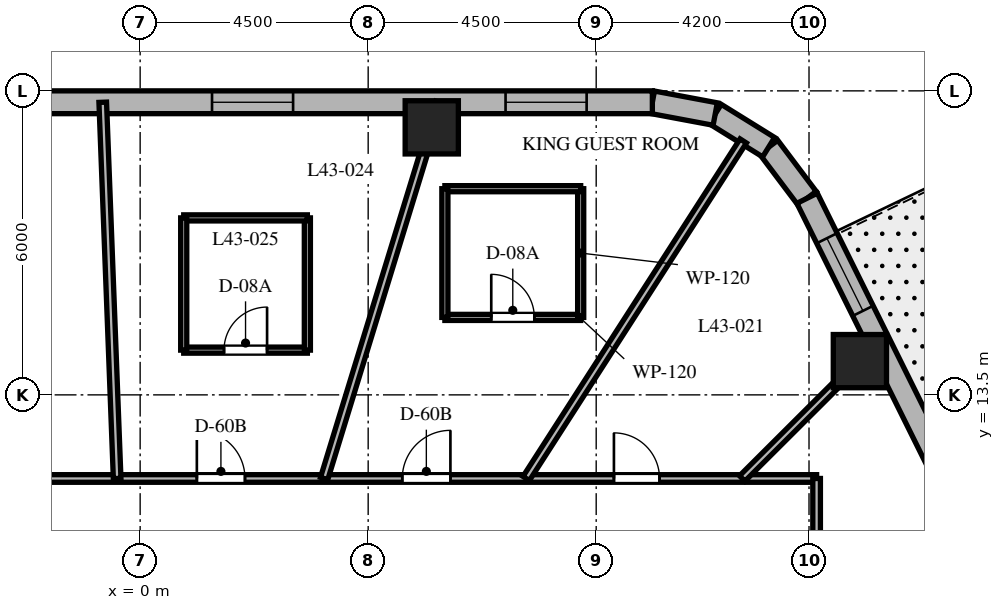
"""IFC4 building model, lengths in metres.
Left out: names, types, materials, properties, quantities, classifications, styles, units other than length and angle.
Written with IfcOpenShell. Run it as: python <this file> out.ifc"""

import sys

from ifc_helpers import new_model, si_unit, direction, frame, frame_2d, origin, origin_2d, place, context, subcontext, project, spatial, rectangle, extrude, element, fill, save


model = new_model("IFC4")
c1 = context("Model", 3, precision=1e-05, world=origin(), true_north=direction((0.0, 1.0)))
c2 = subcontext(c1, "Body", "Model", "MODEL_VIEW")
j1 = project(units=[si_unit("LENGTHUNIT", "METRE"), si_unit("PLANEANGLEUNIT", "RADIAN")], contexts=[c1])
p1 = place(None, origin())
s1 = spatial("IfcSite", under=j1, at=p1, CompositionType="ELEMENT")
p2 = place(p1, origin())
s2 = spatial("IfcBuilding", under=s1, at=p2, CompositionType="ELEMENT")
p3 = place(p2, frame((0.0, 0.0, 175.6)))
s3 = spatial("IfcBuildingStorey", under=s2, at=p3, CompositionType="ELEMENT", Elevation=175.6)
for number, where, z_axis, x_axis in (
    (1, (14.204, 14.166, 0.0), (0.0, 0.0, 1.0), (1.0, 0.0, 0.0)),
    (2, (5.755, 18.78, 0.0), (0.0, 0.0, 1.0), (1.0, 0.0, 0.0)),
):
    element("IfcColumn", number, at=place(p3, frame(where, z_axis=z_axis, x_axis=x_axis)), inside=s3, PredefinedType="COLUMN", context=c2, shape_type="SweptSolid", body=[
        extrude(rectangle(XDim=1.05, YDim=1.05, at=origin_2d()), origin(), (0.0, 0.0, 1.0), 3.7),
    ])
p4 = place(p3, frame((13.162, 17.381, 0.0), z_axis=(0.0, 0.0, 1.0), x_axis=(-0.601515770517, 0.798860925205, 0.0)))
e3 = element("IfcWall", 3, at=p4, inside=s3, PredefinedType="SOLIDWALL", context=c2, shape_type="SweptSolid", body=[
    extrude(rectangle(XDim=1.262, YDim=0.45, at=frame_2d((0.631, 0.0))), origin(), (0.0, 0.0, 1.0), 3.4),
])
p5 = place(p3, frame((12.403, 18.389, 0.0), z_axis=(0.0, 0.0, 1.0), x_axis=(-0.849795170926, 0.527113049991, 0.0)))
e4 = element("IfcWall", 4, at=p5, inside=s3, PredefinedType="SOLIDWALL", context=c2, shape_type="SweptSolid", body=[
    extrude(rectangle(XDim=1.241, YDim=0.45, at=frame_2d((0.62, 0.0))), origin(), (0.0, 0.0, 1.0), 3.4),
])
p6 = place(p3, frame((11.349, 19.043, 0.0), z_axis=(0.0, 0.0, 1.0), x_axis=(-0.982931267051, 0.183973161772, 0.0)))
e5 = element("IfcWall", 5, at=p6, inside=s3, PredefinedType="SOLIDWALL", context=c2, shape_type="SweptSolid", body=[
    extrude(rectangle(XDim=1.262, YDim=0.45, at=frame_2d((0.631, 0.0))), origin(), (0.0, 0.0, 1.0), 3.4),
])
p7 = place(p3, frame((20.618, 2.344, 0.0), z_axis=(0.0, 0.0, 1.0), x_axis=(-0.444243691097, 0.895905990002, 0.0)))
e6 = element("IfcWall", 6, at=p7, inside=s3, PredefinedType="SOLIDWALL", context=c2, shape_type="SweptSolid", body=[
    extrude(rectangle(XDim=16.784, YDim=0.45, at=frame_2d((8.392, 0.0))), origin(), (0.0, 0.0, 1.0), 3.4),
])
p8 = place(p7, frame((4.535, 0.0, 0.0)))
e7 = element("IfcOpeningElement", 7, at=p8, cuts=e6, PredefinedType="OPENING", context=c2, shape_type="SweptSolid", body=[
    extrude(rectangle(XDim=1.0, YDim=2.15, at=frame_2d((0.5, 1.075))), frame((0.0, 0.235, 0.0), z_axis=(0.0, -1.0, 0.0), x_axis=(1.0, 0.0, 0.0)), (0.0, 0.0, 1.0), 0.47),
])
p9 = place(p7, frame((0.931, 0.0, 0.8)))
e8 = element("IfcOpeningElement", 8, at=p9, cuts=e6, PredefinedType="OPENING", context=c2, shape_type="SweptSolid", body=[
    extrude(rectangle(XDim=1.6, YDim=1.75, at=frame_2d((0.8, 0.875))), frame((0.0, 0.235, 0.0), z_axis=(0.0, -1.0, 0.0), x_axis=(1.0, 0.0, 0.0)), (0.0, 0.0, 1.0), 0.47),
])
p10 = place(p7, frame((7.642, 0.0, 0.8)))
e9 = element("IfcOpeningElement", 9, at=p10, cuts=e6, PredefinedType="OPENING", context=c2, shape_type="SweptSolid", body=[
    extrude(rectangle(XDim=1.6, YDim=1.75, at=frame_2d((0.8, 0.875))), frame((0.0, 0.235, 0.0), z_axis=(0.0, -1.0, 0.0), x_axis=(1.0, 0.0, 0.0)), (0.0, 0.0, 1.0), 0.47),
])
p11 = place(p7, frame((14.303, 0.0, 0.8)))
e10 = element("IfcOpeningElement", 10, at=p11, cuts=e6, PredefinedType="OPENING", context=c2, shape_type="SweptSolid", body=[
    extrude(rectangle(XDim=1.6, YDim=1.75, at=frame_2d((0.8, 0.875))), frame((0.0, 0.235, 0.0), z_axis=(0.0, -1.0, 0.0), x_axis=(1.0, 0.0, 0.0)), (0.0, 0.0, 1.0), 0.47),
])
p12 = place(p3, frame((10.108, 19.275, 0.0), z_axis=(0.0, 0.0, 1.0), x_axis=(-1.0, 0.0, 0.0)))
e11 = element("IfcWall", 11, at=p12, inside=s3, PredefinedType="SOLIDWALL", context=c2, shape_type="SweptSolid", body=[
    extrude(rectangle(XDim=21.829, YDim=0.45, at=frame_2d((10.915, 0.0))), origin(), (0.0, 0.0, 1.0), 3.4),
])
p13 = place(p12, frame((1.297, 0.0, 0.8)))
e12 = element("IfcOpeningElement", 12, at=p13, cuts=e11, PredefinedType="OPENING", context=c2, shape_type="SweptSolid", body=[
    extrude(rectangle(XDim=1.6, YDim=1.75, at=frame_2d((0.8, 0.875))), frame((0.0, 0.235, 0.0), z_axis=(0.0, -1.0, 0.0), x_axis=(1.0, 0.0, 0.0)), (0.0, 0.0, 1.0), 0.47),
])
p14 = place(p12, frame((7.09, 0.0, 0.8)))
e13 = element("IfcOpeningElement", 13, at=p14, cuts=e11, PredefinedType="OPENING", context=c2, shape_type="SweptSolid", body=[
    extrude(rectangle(XDim=1.6, YDim=1.75, at=frame_2d((0.8, 0.875))), frame((0.0, 0.235, 0.0), z_axis=(0.0, -1.0, 0.0), x_axis=(1.0, 0.0, 0.0)), (0.0, 0.0, 1.0), 0.47),
])
p15 = place(p12, frame((13.072, 0.0, 0.8)))
e14 = element("IfcOpeningElement", 14, at=p15, cuts=e11, PredefinedType="OPENING", context=c2, shape_type="SweptSolid", body=[
    extrude(rectangle(XDim=1.6, YDim=1.75, at=frame_2d((0.8, 0.875))), frame((0.0, 0.235, 0.0), z_axis=(0.0, -1.0, 0.0), x_axis=(1.0, 0.0, 0.0)), (0.0, 0.0, 1.0), 0.47),
])
p16 = place(p12, frame((18.933, 0.0, 0.8)))
e15 = element("IfcOpeningElement", 15, at=p16, cuts=e11, PredefinedType="OPENING", context=c2, shape_type="SweptSolid", body=[
    extrude(rectangle(XDim=1.6, YDim=1.75, at=frame_2d((0.8, 0.875))), frame((0.0, 0.235, 0.0), z_axis=(0.0, -1.0, 0.0), x_axis=(1.0, 0.0, 0.0)), (0.0, 0.0, 1.0), 0.47),
])
p17 = place(p3, frame((-13.35, 11.85, 0.0), z_axis=(0.0, 0.0, 1.0), x_axis=(1.0, 0.0, 0.0)))
e16 = element("IfcWall", 16, at=p17, inside=s3, PredefinedType="PARTITIONING", context=c2, shape_type="SweptSolid", body=[
    extrude(rectangle(XDim=26.7, YDim=0.15, at=frame_2d((13.35, 0.0))), origin(), (0.0, 0.0, 1.0), 2.84),
])
p18 = place(p17, frame((22.7, 0.0, 0.0)))
e17 = element("IfcOpeningElement", 17, at=p18, cuts=e16, PredefinedType="OPENING", context=c2, shape_type="SweptSolid", body=[
    extrude(rectangle(XDim=0.9, YDim=2.03, at=frame_2d((0.45, 1.015))), frame((0.0, 0.085, 0.0), z_axis=(0.0, -1.0, 0.0), x_axis=(1.0, 0.0, 0.0)), (0.0, 0.0, 1.0), 0.17),
])
p19 = place(p17, frame((18.523, 0.0, 0.0)))
e18 = element("IfcOpeningElement", 18, at=p19, cuts=e16, PredefinedType="OPENING", context=c2, shape_type="SweptSolid", body=[
    extrude(rectangle(XDim=0.95, YDim=2.03, at=frame_2d((0.475, 1.015))), frame((0.0, 0.085, 0.0), z_axis=(0.0, -1.0, 0.0), x_axis=(1.0, 0.0, 0.0)), (0.0, 0.0, 1.0), 0.17),
])
p20 = place(p17, frame((14.469, 0.0, 0.0)))
e19 = element("IfcOpeningElement", 19, at=p20, cuts=e16, PredefinedType="OPENING", context=c2, shape_type="SweptSolid", body=[
    extrude(rectangle(XDim=0.95, YDim=2.03, at=frame_2d((0.475, 1.015))), frame((0.0, 0.085, 0.0), z_axis=(0.0, -1.0, 0.0), x_axis=(1.0, 0.0, 0.0)), (0.0, 0.0, 1.0), 0.17),
])
p21 = place(p17, frame((10.314, 0.0, 0.0)))
e20 = element("IfcOpeningElement", 20, at=p21, cuts=e16, PredefinedType="OPENING", context=c2, shape_type="SweptSolid", body=[
    extrude(rectangle(XDim=0.95, YDim=2.03, at=frame_2d((0.475, 1.015))), frame((0.0, 0.085, 0.0), z_axis=(0.0, -1.0, 0.0), x_axis=(1.0, 0.0, 0.0)), (0.0, 0.0, 1.0), 0.17),
])
p22 = place(p17, frame((6.061, 0.0, 0.0)))
e21 = element("IfcOpeningElement", 21, at=p22, cuts=e16, PredefinedType="OPENING", context=c2, shape_type="SweptSolid", body=[
    extrude(rectangle(XDim=0.95, YDim=2.03, at=frame_2d((0.475, 1.015))), frame((0.0, 0.085, 0.0), z_axis=(0.0, -1.0, 0.0), x_axis=(1.0, 0.0, 0.0)), (0.0, 0.0, 1.0), 0.17),
])
p23 = place(p17, frame((1.886, 0.0, 0.0)))
e22 = element("IfcOpeningElement", 22, at=p23, cuts=e16, PredefinedType="OPENING", context=c2, shape_type="SweptSolid", body=[
    extrude(rectangle(XDim=0.9, YDim=2.03, at=frame_2d((0.45, 1.015))), frame((0.0, 0.085, 0.0), z_axis=(0.0, -1.0, 0.0), x_axis=(1.0, 0.0, 0.0)), (0.0, 0.0, 1.0), 0.17),
])
p24 = place(p3, frame((13.35, 11.85, 0.0), z_axis=(0.0, 0.0, 1.0), x_axis=(0.0, -1.0, 0.0)))
e23 = element("IfcWall", 23, at=p24, inside=s3, PredefinedType="PARTITIONING", context=c2, shape_type="SweptSolid", body=[
    extrude(rectangle(XDim=23.7, YDim=0.15, at=frame_2d((11.85, 0.0))), origin(), (0.0, 0.0, 1.0), 2.84),
])
p25 = place(p24, frame((9.27, 0.0, 0.0)))
e24 = element("IfcOpeningElement", 24, at=p25, cuts=e23, PredefinedType="OPENING", context=c2, shape_type="SweptSolid", body=[
    extrude(rectangle(XDim=0.9, YDim=2.03, at=frame_2d((0.45, 1.015))), frame((0.0, 0.085, 0.0), z_axis=(0.0, -1.0, 0.0), x_axis=(1.0, 0.0, 0.0)), (0.0, 0.0, 1.0), 0.17),
])
p26 = place(p24, frame((3.765, 0.0, 0.0)))
e25 = element("IfcOpeningElement", 25, at=p26, cuts=e23, PredefinedType="OPENING", context=c2, shape_type="SweptSolid", body=[
    extrude(rectangle(XDim=0.9, YDim=2.03, at=frame_2d((0.45, 1.015))), frame((0.0, 0.085, 0.0), z_axis=(0.0, -1.0, 0.0), x_axis=(1.0, 0.0, 0.0)), (0.0, 0.0, 1.0), 0.17),
])
p27 = place(p24, frame((20.662, 0.0, 0.0)))
e26 = element("IfcOpeningElement", 26, at=p27, cuts=e23, PredefinedType="OPENING", context=c2, shape_type="SweptSolid", body=[
    extrude(rectangle(XDim=0.9, YDim=2.03, at=frame_2d((0.45, 1.015))), frame((0.0, 0.085, 0.0), z_axis=(0.0, -1.0, 0.0), x_axis=(1.0, 0.0, 0.0)), (0.0, 0.0, 1.0), 0.17),
])
p28 = place(p24, frame((16.055, 0.0, 0.0)))
e27 = element("IfcOpeningElement", 27, at=p28, cuts=e23, PredefinedType="OPENING", context=c2, shape_type="SweptSolid", body=[
    extrude(rectangle(XDim=0.95, YDim=2.03, at=frame_2d((0.475, 1.015))), frame((0.0, 0.085, 0.0), z_axis=(0.0, -1.0, 0.0), x_axis=(1.0, 0.0, 0.0)), (0.0, 0.0, 1.0), 0.17),
])
p29 = place(p24, frame((12.315, 0.0, 0.0)))
e28 = element("IfcOpeningElement", 28, at=p29, cuts=e23, PredefinedType="OPENING", context=c2, shape_type="SweptSolid", body=[
    extrude(rectangle(XDim=0.9, YDim=2.03, at=frame_2d((0.45, 1.015))), frame((0.0, 0.085, 0.0), z_axis=(0.0, -1.0, 0.0), x_axis=(1.0, 0.0, 0.0)), (0.0, 0.0, 1.0), 0.17),
])
p30 = place(p3, frame((11.882, 11.85, 0.0), z_axis=(0.0, 0.0, 1.0), x_axis=(0.708037373639, 0.706174962407, 0.0)))
e29 = element("IfcWall", 29, at=p30, inside=s3, PredefinedType="PARTITIONING", context=c2, shape_type="SweptSolid", body=[
    extrude(rectangle(XDim=3.802, YDim=0.15, at=frame_2d((1.901, 0.0))), origin(), (0.0, 0.0, 1.0), 2.64),
])
p31 = place(p3, frame((7.619, 11.85, 0.0), z_axis=(0.0, 0.0, 1.0), x_axis=(0.540829263478, 0.841132396098, 0.0)))
e30 = element("IfcWall", 30, at=p31, inside=s3, PredefinedType="PARTITIONING", context=c2, shape_type="SweptSolid", body=[
    extrude(rectangle(XDim=7.919, YDim=0.15, at=frame_2d((3.959, 0.0))), origin(), (0.0, 0.0, 1.0), 2.64),
])
p32 = place(p3, frame((3.631, 11.85, 0.0), z_axis=(0.0, 0.0, 1.0), x_axis=(0.293007573338, 0.956110120209, 0.0)))
e31 = element("IfcWall", 31, at=p32, inside=s3, PredefinedType="PARTITIONING", context=c2, shape_type="SweptSolid", body=[
    extrude(rectangle(XDim=7.766, YDim=0.15, at=frame_2d((3.883, 0.0))), origin(), (0.0, 0.0, 1.0), 2.64),
])
p33 = place(p3, frame((-0.454, 11.85, 0.0), z_axis=(0.0, 0.0, 1.0), x_axis=(-0.038279171143, 0.999267083945, 0.0)))
e32 = element("IfcWall", 32, at=p33, inside=s3, PredefinedType="PARTITIONING", context=c2, shape_type="SweptSolid", body=[
    extrude(rectangle(XDim=7.43, YDim=0.15, at=frame_2d((3.715, 0.0))), origin(), (0.0, 0.0, 1.0), 2.64),
])
p34 = place(p3, frame((6.014, 15.029, 0.0), z_axis=(0.0, 0.0, 1.0), x_axis=(1.0, 0.0, 0.0)))
e33 = element("IfcWall", 33, at=p34, inside=s3, PredefinedType="PARTITIONING", context=c2, shape_type="SweptSolid", body=[
    extrude(rectangle(XDim=2.68, YDim=0.12, at=frame_2d((1.34, 0.0))), origin(), (0.0, 0.0, 1.0), 3.4),
])
p35 = place(p34, frame((0.915, 0.0, 0.0)))
e34 = element("IfcOpeningElement", 34, at=p35, cuts=e33, PredefinedType="OPENING", context=c2, shape_type="SweptSolid", body=[
    extrude(rectangle(XDim=0.85, YDim=2.03, at=frame_2d((0.425, 1.015))), frame((0.0, 0.07, 0.0), z_axis=(0.0, -1.0, 0.0), x_axis=(1.0, 0.0, 0.0)), (0.0, 0.0, 1.0), 0.14),
])
p36 = place(p3, frame((8.694, 15.029, 0.0), z_axis=(0.0, 0.0, 1.0), x_axis=(0.0, 1.0, 0.0)))
e35 = element("IfcWall", 35, at=p36, inside=s3, PredefinedType="PARTITIONING", context=c2, shape_type="SweptSolid", body=[
    extrude(rectangle(XDim=2.54, YDim=0.12, at=frame_2d((1.27, 0.0))), origin(), (0.0, 0.0, 1.0), 2.64),
])
p37 = place(p3, frame((8.694, 17.569, 0.0), z_axis=(0.0, 0.0, 1.0), x_axis=(-1.0, 0.0, 0.0)))
e36 = element("IfcWall", 36, at=p37, inside=s3, PredefinedType="PARTITIONING", context=c2, shape_type="SweptSolid", body=[
    extrude(rectangle(XDim=2.68, YDim=0.12, at=frame_2d((1.34, 0.0))), origin(), (0.0, 0.0, 1.0), 2.64),
])
p38 = place(p3, frame((6.014, 17.569, 0.0), z_axis=(0.0, 0.0, 1.0), x_axis=(0.0, -1.0, 0.0)))
e37 = element("IfcWall", 37, at=p38, inside=s3, PredefinedType="PARTITIONING", context=c2, shape_type="SweptSolid", body=[
    extrude(rectangle(XDim=2.54, YDim=0.12, at=frame_2d((1.27, 0.0))), origin(), (0.0, 0.0, 1.0), 3.4),
])
p39 = place(p3, frame((0.86, 14.383, 0.0), z_axis=(0.0, 0.0, 1.0), x_axis=(1.0, 0.0, 0.0)))
e38 = element("IfcWall", 38, at=p39, inside=s3, PredefinedType="PARTITIONING", context=c2, shape_type="SweptSolid", body=[
    extrude(rectangle(XDim=2.44, YDim=0.12, at=frame_2d((1.22, 0.0))), origin(), (0.0, 0.0, 1.0), 3.4),
])
p40 = place(p39, frame((0.795, 0.0, 0.0)))
e39 = element("IfcOpeningElement", 39, at=p40, cuts=e38, PredefinedType="OPENING", context=c2, shape_type="SweptSolid", body=[
    extrude(rectangle(XDim=0.85, YDim=2.03, at=frame_2d((0.425, 1.015))), frame((0.0, 0.07, 0.0), z_axis=(0.0, -1.0, 0.0), x_axis=(1.0, 0.0, 0.0)), (0.0, 0.0, 1.0), 0.14),
])
p41 = place(p3, frame((3.3, 14.383, 0.0), z_axis=(0.0, 0.0, 1.0), x_axis=(0.0, 1.0, 0.0)))
e40 = element("IfcWall", 40, at=p41, inside=s3, PredefinedType="PARTITIONING", context=c2, shape_type="SweptSolid", body=[
    extrude(rectangle(XDim=2.61, YDim=0.12, at=frame_2d((1.305, 0.0))), origin(), (0.0, 0.0, 1.0), 2.84),
])
p42 = place(p3, frame((3.3, 16.993, 0.0), z_axis=(0.0, 0.0, 1.0), x_axis=(-1.0, 0.0, 0.0)))
e41 = element("IfcWall", 41, at=p42, inside=s3, PredefinedType="PARTITIONING", context=c2, shape_type="SweptSolid", body=[
    extrude(rectangle(XDim=2.44, YDim=0.12, at=frame_2d((1.22, 0.0))), origin(), (0.0, 0.0, 1.0), 3.4),
])
p43 = place(p3, frame((0.86, 16.993, 0.0), z_axis=(0.0, 0.0, 1.0), x_axis=(0.0, -1.0, 0.0)))
e42 = element("IfcWall", 42, at=p43, inside=s3, PredefinedType="PARTITIONING", context=c2, shape_type="SweptSolid", body=[
    extrude(rectangle(XDim=2.61, YDim=0.12, at=frame_2d((1.305, 0.0))), origin(), (0.0, 0.0, 1.0), 2.84),
])
p44 = place(p11, origin())
e43 = element("IfcWindow", 43, at=p44, inside=s3, PartitioningType="SINGLE_PANEL", PredefinedType="WINDOW", context=c2, shape_type="SweptSolid", body=[
    extrude(rectangle(XDim=1.6, YDim=1.75, at=frame_2d((0.8, 0.875))), frame((0.0, 0.03, 0.0), z_axis=(0.0, -1.0, 0.0), x_axis=(1.0, 0.0, 0.0)), (0.0, 0.0, 1.0), 0.06),
])
fill(e10, e43)
p45 = place(p13, origin())
e44 = element("IfcWindow", 44, at=p45, inside=s3, PartitioningType="SINGLE_PANEL", PredefinedType="WINDOW", context=c2, shape_type="SweptSolid", body=[
    extrude(rectangle(XDim=1.6, YDim=1.75, at=frame_2d((0.8, 0.875))), frame((0.0, 0.03, 0.0), z_axis=(0.0, -1.0, 0.0), x_axis=(1.0, 0.0, 0.0)), (0.0, 0.0, 1.0), 0.06),
])
fill(e12, e44)
p46 = place(p14, origin())
e45 = element("IfcWindow", 45, at=p46, inside=s3, PartitioningType="SINGLE_PANEL", PredefinedType="WINDOW", context=c2, shape_type="SweptSolid", body=[
    extrude(rectangle(XDim=1.6, YDim=1.75, at=frame_2d((0.8, 0.875))), frame((0.0, 0.03, 0.0), z_axis=(0.0, -1.0, 0.0), x_axis=(1.0, 0.0, 0.0)), (0.0, 0.0, 1.0), 0.06),
])
fill(e13, e45)
p47 = place(p18, origin())
e46 = element("IfcDoor", 46, at=p47, inside=s3, OperationType="SINGLE_SWING_LEFT", PredefinedType="DOOR", context=c2, shape_type="SweptSolid", body=[
    extrude(rectangle(XDim=0.9, YDim=2.03, at=frame_2d((0.45, 1.015))), frame((0.0, 0.025, 0.0), z_axis=(0.0, -1.0, 0.0), x_axis=(1.0, 0.0, 0.0)), (0.0, 0.0, 1.0), 0.05),
])
fill(e17, e46)
p48 = place(p19, origin())
e47 = element("IfcDoor", 47, at=p48, inside=s3, OperationType="SINGLE_SWING_RIGHT", PredefinedType="DOOR", context=c2, shape_type="SweptSolid", body=[
    extrude(rectangle(XDim=0.95, YDim=2.03, at=frame_2d((0.475, 1.015))), frame((0.0, 0.025, 0.0), z_axis=(0.0, -1.0, 0.0), x_axis=(1.0, 0.0, 0.0)), (0.0, 0.0, 1.0), 0.05),
])
fill(e18, e47)
p49 = place(p35, origin())
e48 = element("IfcDoor", 48, at=p49, inside=s3, OperationType="SINGLE_SWING_LEFT", PredefinedType="DOOR", context=c2, shape_type="SweptSolid", body=[
    extrude(rectangle(XDim=0.85, YDim=2.03, at=frame_2d((0.425, 1.015))), frame((0.0, 0.025, 0.0), z_axis=(0.0, -1.0, 0.0), x_axis=(1.0, 0.0, 0.0)), (0.0, 0.0, 1.0), 0.05),
])
fill(e34, e48)
p50 = place(p20, origin())
e49 = element("IfcDoor", 49, at=p50, inside=s3, OperationType="SINGLE_SWING_LEFT", PredefinedType="DOOR", context=c2, shape_type="SweptSolid", body=[
    extrude(rectangle(XDim=0.95, YDim=2.03, at=frame_2d((0.475, 1.015))), frame((0.0, 0.025, 0.0), z_axis=(0.0, -1.0, 0.0), x_axis=(1.0, 0.0, 0.0)), (0.0, 0.0, 1.0), 0.05),
])
fill(e19, e49)
p51 = place(p40, origin())
e50 = element("IfcDoor", 50, at=p51, inside=s3, OperationType="SINGLE_SWING_RIGHT", PredefinedType="DOOR", context=c2, shape_type="SweptSolid", body=[
    extrude(rectangle(XDim=0.85, YDim=2.03, at=frame_2d((0.425, 1.015))), frame((0.0, 0.025, 0.0), z_axis=(0.0, -1.0, 0.0), x_axis=(1.0, 0.0, 0.0)), (0.0, 0.0, 1.0), 0.05),
])
fill(e39, e50)
save(model, sys.argv[1])
